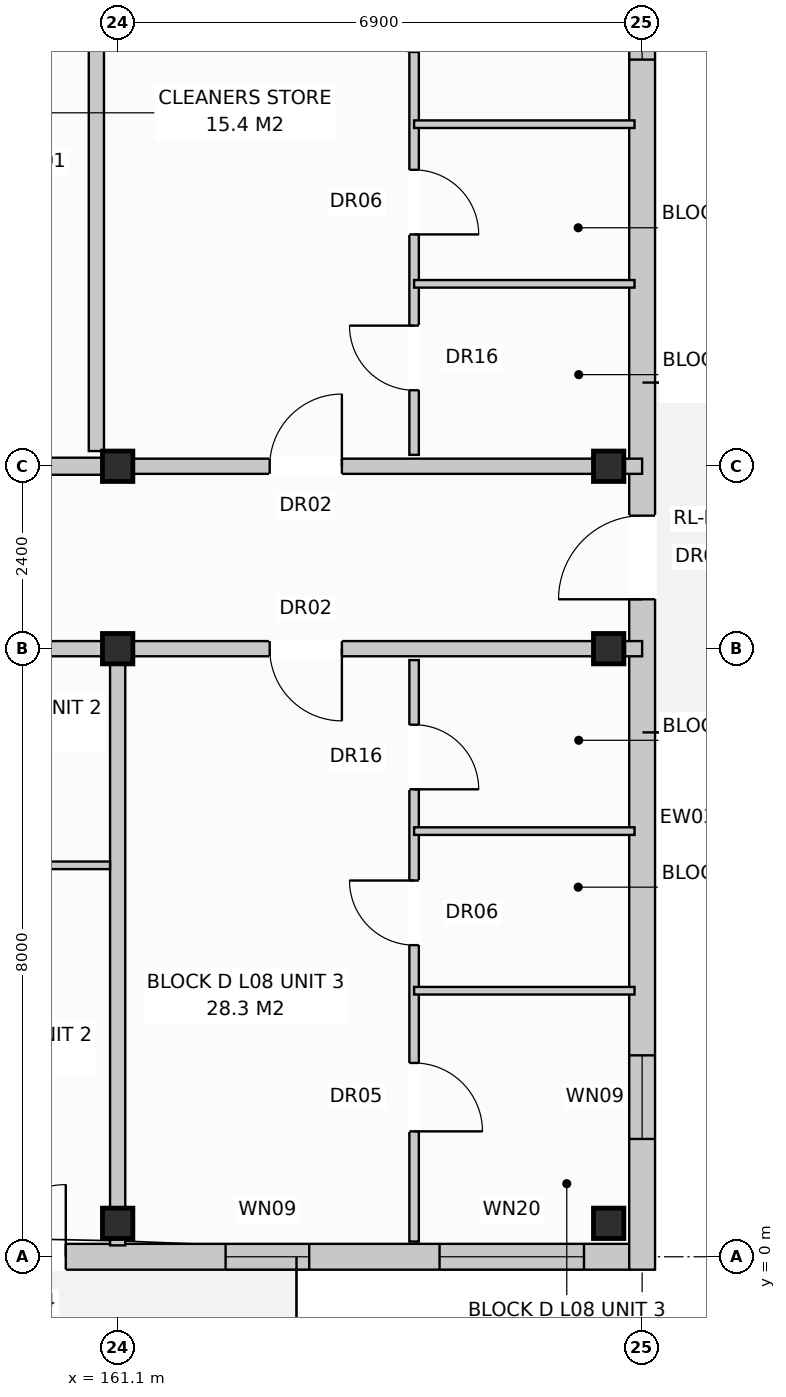
"""IFC4 building model, lengths in metres.
Left out: names, types, materials, properties, quantities, classifications, styles, units other than length and angle.
Written with IfcOpenShell. Run it as: python <this file> out.ifc"""

import sys

from ifc_helpers import new_model, si_unit, direction, frame, frame_2d, origin, origin_with_axes, origin_2d, place, context, subcontext, project, spatial, rectangle, extrude, element, fill, save


model = new_model("IFC4")
c1 = context("Model", 3, precision=1e-05, world=origin(), true_north=direction((0.0, 1.0)))
c2 = subcontext(c1, "Body", "Model", "MODEL_VIEW")
j1 = project(units=[si_unit("LENGTHUNIT", "METRE"), si_unit("PLANEANGLEUNIT", "RADIAN")], contexts=[c1])
p1 = place(None, origin())
s1 = spatial("IfcSite", under=j1, at=p1, CompositionType="ELEMENT")
p2 = place(p1, origin())
s2 = spatial("IfcBuilding", under=s1, at=p2, CompositionType="ELEMENT")
p3 = place(p2, frame((0.0, 0.0, 27.2)))
s3 = spatial("IfcBuildingStorey", under=s2, at=p3, CompositionType="ELEMENT", Elevation=27.2)
for number, where, z_axis, x_axis in (
    (1, (161.1, 0.44, 0.0), (0.0, 0.0, 1.0), (1.0, 0.0, 0.0)),
    (2, (161.1, 8.0, 0.0), (0.0, 0.0, 1.0), (1.0, 0.0, 0.0)),
    (3, (161.1, 10.4, 0.0), (0.0, 0.0, 1.0), (1.0, 0.0, 0.0)),
    (4, (167.56, 0.44, 0.0), (0.0, 0.0, 1.0), (1.0, 0.0, 0.0)),
    (5, (167.56, 8.0, 0.0), (0.0, 0.0, 1.0), (1.0, 0.0, 0.0)),
    (6, (167.56, 10.4, 0.0), (0.0, 0.0, 1.0), (1.0, 0.0, 0.0)),
):
    element("IfcColumn", number, at=place(p3, frame(where, z_axis=z_axis, x_axis=x_axis)), inside=s3, PredefinedType="COLUMN", context=c2, shape_type="SweptSolid", body=[
        extrude(rectangle(XDim=0.4, YDim=0.4, at=origin_2d()), origin(), (0.0, 0.0, 1.0), 3.2),
    ])
p4 = place(p3, frame((126.76, 0.0, 0.0), z_axis=(0.0, 0.0, 1.0), x_axis=(1.0, 0.0, 0.0)))
e7 = element("IfcWall", 7, at=p4, inside=s3, PredefinedType="STANDARD", context=c2, shape_type="SweptSolid", body=[
    extrude(rectangle(XDim=41.08, YDim=0.34, at=frame_2d((20.54, 0.0))), origin(), (0.0, 0.0, 1.0), 2.91),
])
p5 = place(p4, frame((7.41, 0.0, 0.0)))
e8 = element("IfcOpeningElement", 8, at=p5, cuts=e7, PredefinedType="OPENING", context=c2, shape_type="SweptSolid", body=[
    extrude(rectangle(XDim=0.95, YDim=2.1, at=frame_2d((0.475, 1.05))), frame((0.0, 0.182, 0.0), z_axis=(0.0, -1.0, 0.0), x_axis=(1.0, 0.0, 0.0)), (0.0, 0.0, 1.0), 0.364),
])
p6 = place(p4, frame((18.707, 0.0, 0.0)))
e9 = element("IfcOpeningElement", 9, at=p6, cuts=e7, PredefinedType="OPENING", context=c2, shape_type="SweptSolid", body=[
    extrude(rectangle(XDim=0.95, YDim=2.1, at=frame_2d((0.475, 1.05))), frame((0.0, 0.182, 0.0), z_axis=(0.0, -1.0, 0.0), x_axis=(1.0, 0.0, 0.0)), (0.0, 0.0, 1.0), 0.364),
])
p7 = place(p4, frame((32.707, 0.0, 0.0)))
e10 = element("IfcOpeningElement", 10, at=p7, cuts=e7, PredefinedType="OPENING", context=c2, shape_type="SweptSolid", body=[
    extrude(rectangle(XDim=0.95, YDim=2.1, at=frame_2d((0.475, 1.05))), frame((0.0, 0.182, 0.0), z_axis=(0.0, -1.0, 0.0), x_axis=(1.0, 0.0, 0.0)), (0.0, 0.0, 1.0), 0.364),
])
p8 = place(p4, frame((1.61, 0.0, 0.8)))
e11 = element("IfcOpeningElement", 11, at=p8, cuts=e7, PredefinedType="OPENING", context=c2, shape_type="SweptSolid", body=[
    extrude(rectangle(XDim=1.8, YDim=1.7, at=frame_2d((0.9, 0.85))), frame((0.0, 0.182, 0.0), z_axis=(0.0, -1.0, 0.0), x_axis=(1.0, 0.0, 0.0)), (0.0, 0.0, 1.0), 0.364),
])
p9 = place(p4, frame((10.46, 0.0, 0.8)))
e12 = element("IfcOpeningElement", 12, at=p9, cuts=e7, PredefinedType="OPENING", context=c2, shape_type="SweptSolid", body=[
    extrude(rectangle(XDim=1.9, YDim=1.85, at=frame_2d((0.95, 0.925))), frame((0.0, 0.182, 0.0), z_axis=(0.0, -1.0, 0.0), x_axis=(1.0, 0.0, 0.0)), (0.0, 0.0, 1.0), 0.364),
])
p10 = place(p4, frame((15.835, 0.0, 0.8)))
e13 = element("IfcOpeningElement", 13, at=p10, cuts=e7, PredefinedType="OPENING", context=c2, shape_type="SweptSolid", body=[
    extrude(rectangle(XDim=1.95, YDim=1.65, at=frame_2d((0.975, 0.825))), frame((0.0, 0.182, 0.0), z_axis=(0.0, -1.0, 0.0), x_axis=(1.0, 0.0, 0.0)), (0.0, 0.0, 1.0), 0.364),
])
p11 = place(p4, frame((21.96, 0.0, 0.72)))
e14 = element("IfcOpeningElement", 14, at=p11, cuts=e7, PredefinedType="OPENING", context=c2, shape_type="SweptSolid", body=[
    extrude(rectangle(XDim=1.1, YDim=1.5, at=frame_2d((0.55, 0.75))), frame((0.0, 0.182, 0.0), z_axis=(0.0, -1.0, 0.0), x_axis=(1.0, 0.0, 0.0)), (0.0, 0.0, 1.0), 0.364),
])
p12 = place(p4, frame((27.96, 0.0, 0.8)))
e15 = element("IfcOpeningElement", 15, at=p12, cuts=e7, PredefinedType="OPENING", context=c2, shape_type="SweptSolid", body=[
    extrude(rectangle(XDim=1.9, YDim=1.85, at=frame_2d((0.95, 0.925))), frame((0.0, 0.182, 0.0), z_axis=(0.0, -1.0, 0.0), x_axis=(1.0, 0.0, 0.0)), (0.0, 0.0, 1.0), 0.364),
])
p13 = place(p4, frame((30.81, 0.0, 0.85)))
e16 = element("IfcOpeningElement", 16, at=p13, cuts=e7, PredefinedType="OPENING", context=c2, shape_type="SweptSolid", body=[
    extrude(rectangle(XDim=1.5, YDim=1.65, at=frame_2d((0.75, 0.825))), frame((0.0, 0.182, 0.0), z_axis=(0.0, -1.0, 0.0), x_axis=(1.0, 0.0, 0.0)), (0.0, 0.0, 1.0), 0.364),
])
p14 = place(p4, frame((35.76, 0.0, 0.72)))
e17 = element("IfcOpeningElement", 17, at=p14, cuts=e7, PredefinedType="OPENING", context=c2, shape_type="SweptSolid", body=[
    extrude(rectangle(XDim=1.1, YDim=1.5, at=frame_2d((0.55, 0.75))), frame((0.0, 0.182, 0.0), z_axis=(0.0, -1.0, 0.0), x_axis=(1.0, 0.0, 0.0)), (0.0, 0.0, 1.0), 0.364),
])
p15 = place(p4, frame((38.575, 0.0, 0.8)))
e18 = element("IfcOpeningElement", 18, at=p15, cuts=e7, PredefinedType="OPENING", context=c2, shape_type="SweptSolid", body=[
    extrude(rectangle(XDim=1.9, YDim=1.85, at=frame_2d((0.95, 0.925))), frame((0.0, 0.182, 0.0), z_axis=(0.0, -1.0, 0.0), x_axis=(1.0, 0.0, 0.0)), (0.0, 0.0, 1.0), 0.364),
])
p16 = place(p3, frame((168.0, -0.17, 0.0), z_axis=(0.0, 0.0, 1.0), x_axis=(0.0, 1.0, 0.0)))
e19 = element("IfcWall", 19, at=p16, inside=s3, PredefinedType="STANDARD", context=c2, shape_type="SweptSolid", body=[
    extrude(rectangle(XDim=18.74, YDim=0.34, at=frame_2d((9.37, 0.0))), origin(), (0.0, 0.0, 1.0), 2.91),
])
p17 = place(p16, frame((8.82, 0.0, 0.0)))
e20 = element("IfcOpeningElement", 20, at=p17, cuts=e19, PredefinedType="OPENING", context=c2, shape_type="SweptSolid", body=[
    extrude(rectangle(XDim=1.1, YDim=2.1, at=frame_2d((0.55, 1.05))), frame((0.0, 0.182, 0.0), z_axis=(0.0, -1.0, 0.0), x_axis=(1.0, 0.0, 0.0)), (0.0, 0.0, 1.0), 0.364),
])
p18 = place(p16, frame((1.72, 0.0, 0.72)))
e21 = element("IfcOpeningElement", 21, at=p18, cuts=e19, PredefinedType="OPENING", context=c2, shape_type="SweptSolid", body=[
    extrude(rectangle(XDim=1.1, YDim=1.5, at=frame_2d((0.55, 0.75))), frame((0.0, 0.182, 0.0), z_axis=(0.0, -1.0, 0.0), x_axis=(1.0, 0.0, 0.0)), (0.0, 0.0, 1.0), 0.364),
])
p19 = place(p16, frame((15.92, 0.0, 0.72)))
e22 = element("IfcOpeningElement", 22, at=p19, cuts=e19, PredefinedType="OPENING", context=c2, shape_type="SweptSolid", body=[
    extrude(rectangle(XDim=1.1, YDim=1.5, at=frame_2d((0.55, 0.75))), frame((0.0, 0.182, 0.0), z_axis=(0.0, -1.0, 0.0), x_axis=(1.0, 0.0, 0.0)), (0.0, 0.0, 1.0), 0.364),
])
p20 = place(p3, frame((160.82, 10.6, 0.0), z_axis=(0.0, 0.0, 1.0), x_axis=(0.0, 1.0, 0.0)))
e23 = element("IfcWall", 23, at=p20, inside=s3, PredefinedType="PARTITIONING", context=c2, shape_type="SweptSolid", body=[
    extrude(rectangle(XDim=7.6, YDim=0.2, at=frame_2d((3.8, 0.0))), origin(), (0.0, 0.0, 1.0), 2.35),
])
p21 = place(p3, frame((151.1, 10.4, 0.0), z_axis=(0.0, 0.0, 1.0), x_axis=(1.0, 0.0, 0.0)))
e24 = element("IfcWall", 24, at=p21, inside=s3, PredefinedType="PARTITIONING", context=c2, shape_type="SweptSolid", body=[
    extrude(rectangle(XDim=10.0, YDim=0.225, at=frame_2d((5.0, 0.0))), origin(), (0.0, 0.0, 1.0), 2.35),
])
p22 = place(p21, frame((0.475, 0.0, 0.0)))
e25 = element("IfcOpeningElement", 25, at=p22, cuts=e24, PredefinedType="OPENING", context=c2, shape_type="SweptSolid", body=[
    extrude(rectangle(XDim=1.1, YDim=2.15, at=frame_2d((0.55, 1.075))), frame((0.0, 0.125, 0.0), z_axis=(0.0, -1.0, 0.0), x_axis=(1.0, 0.0, 0.0)), (0.0, 0.0, 1.0), 0.249),
])
p23 = place(p21, frame((5.85, 0.0, 0.0)))
e26 = element("IfcOpeningElement", 26, at=p23, cuts=e24, PredefinedType="OPENING", context=c2, shape_type="SweptSolid", body=[
    extrude(rectangle(XDim=0.9, YDim=2.1, at=frame_2d((0.45, 1.05))), frame((0.0, 0.125, 0.0), z_axis=(0.0, -1.0, 0.0), x_axis=(1.0, 0.0, 0.0)), (0.0, 0.0, 1.0), 0.249),
])
p24 = place(p21, frame((7.9, 0.0, 0.0)))
e27 = element("IfcOpeningElement", 27, at=p24, cuts=e24, PredefinedType="OPENING", context=c2, shape_type="SweptSolid", body=[
    extrude(rectangle(XDim=0.95, YDim=2.15, at=frame_2d((0.475, 1.075))), frame((0.0, 0.125, 0.0), z_axis=(0.0, -1.0, 0.0), x_axis=(1.0, 0.0, 0.0)), (0.0, 0.0, 1.0), 0.249),
])
p25 = place(p3, frame((161.1, 7.85, 0.0), z_axis=(0.0, 0.0, 1.0), x_axis=(0.0, -1.0, 0.0)))
e28 = element("IfcWall", 28, at=p25, inside=s3, PredefinedType="PARTITIONING", context=c2, shape_type="SweptSolid", body=[
    extrude(rectangle(XDim=7.7, YDim=0.2, at=frame_2d((3.85, 0.0))), origin(), (0.0, 0.0, 1.0), 2.35),
])
p26 = place(p3, frame((140.4, 8.0, 0.0), z_axis=(0.0, 0.0, 1.0), x_axis=(1.0, 0.0, 0.0)))
e29 = element("IfcWall", 29, at=p26, inside=s3, PredefinedType="PARTITIONING", context=c2, shape_type="SweptSolid", body=[
    extrude(rectangle(XDim=20.7, YDim=0.2, at=frame_2d((10.35, 0.0))), origin(), (0.0, 0.0, 1.0), 2.35),
])
p27 = place(p26, frame((2.4, 0.0, 0.0)))
e30 = element("IfcOpeningElement", 30, at=p27, cuts=e29, PredefinedType="OPENING", context=c2, shape_type="SweptSolid", body=[
    extrude(rectangle(XDim=0.95, YDim=2.15, at=frame_2d((0.475, 1.075))), frame((0.0, 0.112, 0.0), z_axis=(0.0, -1.0, 0.0), x_axis=(1.0, 0.0, 0.0)), (0.0, 0.0, 1.0), 0.224),
])
p28 = place(p3, frame((146.7, 5.15, 0.0), z_axis=(0.0, 0.0, 1.0), x_axis=(1.0, 0.0, 0.0)))
e31 = element("IfcWall", 31, at=p28, inside=s3, PredefinedType="PARTITIONING", context=c2, shape_type="SweptSolid", body=[
    extrude(rectangle(XDim=14.3, YDim=0.1, at=frame_2d((7.15, 0.0))), origin(), (0.0, 0.0, 1.0), 2.96),
])
p29 = place(p28, frame((1.6, 0.0, 0.0)))
e32 = element("IfcOpeningElement", 32, at=p29, cuts=e31, PredefinedType="OPENING", context=c2, shape_type="SweptSolid", body=[
    extrude(rectangle(XDim=0.9, YDim=2.1, at=frame_2d((0.45, 1.05))), frame((0.0, 0.062, 0.0), z_axis=(0.0, -1.0, 0.0), x_axis=(1.0, 0.0, 0.0)), (0.0, 0.0, 1.0), 0.124),
])
p30 = place(p28, frame((5.1, 0.0, 0.0)))
e33 = element("IfcOpeningElement", 33, at=p30, cuts=e31, PredefinedType="OPENING", context=c2, shape_type="SweptSolid", body=[
    extrude(rectangle(XDim=0.85, YDim=2.05, at=frame_2d((0.425, 1.025))), frame((0.0, 0.062, 0.0), z_axis=(0.0, -1.0, 0.0), x_axis=(1.0, 0.0, 0.0)), (0.0, 0.0, 1.0), 0.124),
])
p31 = place(p28, frame((8.2, 0.0, 0.0)))
e34 = element("IfcOpeningElement", 34, at=p31, cuts=e31, PredefinedType="OPENING", context=c2, shape_type="SweptSolid", body=[
    extrude(rectangle(XDim=0.85, YDim=2.05, at=frame_2d((0.425, 1.025))), frame((0.0, 0.062, 0.0), z_axis=(0.0, -1.0, 0.0), x_axis=(1.0, 0.0, 0.0)), (0.0, 0.0, 1.0), 0.124),
])
p32 = place(p28, frame((11.6, 0.0, 0.0)))
e35 = element("IfcOpeningElement", 35, at=p32, cuts=e31, PredefinedType="OPENING", context=c2, shape_type="SweptSolid", body=[
    extrude(rectangle(XDim=0.85, YDim=2.05, at=frame_2d((0.425, 1.025))), frame((0.0, 0.062, 0.0), z_axis=(0.0, -1.0, 0.0), x_axis=(1.0, 0.0, 0.0)), (0.0, 0.0, 1.0), 0.124),
])
p33 = place(p3, frame((161.1, 8.0, 0.0), z_axis=(0.0, 0.0, 1.0), x_axis=(1.0, 0.0, 0.0)))
e36 = element("IfcWall", 36, at=p33, inside=s3, PredefinedType="PARTITIONING", context=c2, shape_type="SweptSolid", body=[
    extrude(rectangle(XDim=6.9, YDim=0.2, at=frame_2d((3.45, 0.0))), origin(), (0.0, 0.0, 1.0), 2.35),
])
p34 = place(p33, frame((2.0, 0.0, 0.0)))
e37 = element("IfcOpeningElement", 37, at=p34, cuts=e36, PredefinedType="OPENING", context=c2, shape_type="SweptSolid", body=[
    extrude(rectangle(XDim=0.95, YDim=2.15, at=frame_2d((0.475, 1.075))), frame((0.0, 0.112, 0.0), z_axis=(0.0, -1.0, 0.0), x_axis=(1.0, 0.0, 0.0)), (0.0, 0.0, 1.0), 0.224),
])
p35 = place(p3, frame((165.0, 7.85, 0.0), z_axis=(0.0, 0.0, 1.0), x_axis=(0.0, -1.0, 0.0)))
e38 = element("IfcWall", 38, at=p35, inside=s3, PredefinedType="PARTITIONING", context=c2, shape_type="SweptSolid", body=[
    extrude(rectangle(XDim=7.65, YDim=0.125, at=frame_2d((3.825, 0.0))), origin(), (0.0, 0.0, 1.0), 2.96),
])
p36 = place(p35, frame((0.85, 0.0, 0.0)))
e39 = element("IfcOpeningElement", 39, at=p36, cuts=e38, PredefinedType="OPENING", context=c2, shape_type="SweptSolid", body=[
    extrude(rectangle(XDim=0.85, YDim=2.1, at=frame_2d((0.425, 1.05))), frame((0.0, 0.074, 0.0), z_axis=(0.0, -1.0, 0.0), x_axis=(1.0, 0.0, 0.0)), (0.0, 0.0, 1.0), 0.149),
])
p37 = place(p35, frame((2.9, 0.0, 0.0)))
e40 = element("IfcOpeningElement", 40, at=p37, cuts=e38, PredefinedType="OPENING", context=c2, shape_type="SweptSolid", body=[
    extrude(rectangle(XDim=0.85, YDim=2.05, at=frame_2d((0.425, 1.025))), frame((0.0, 0.074, 0.0), z_axis=(0.0, -1.0, 0.0), x_axis=(1.0, 0.0, 0.0)), (0.0, 0.0, 1.0), 0.149),
])
p38 = place(p35, frame((5.3, 0.0, 0.0)))
e41 = element("IfcOpeningElement", 41, at=p38, cuts=e38, PredefinedType="OPENING", context=c2, shape_type="SweptSolid", body=[
    extrude(rectangle(XDim=0.9, YDim=2.1, at=frame_2d((0.45, 1.05))), frame((0.0, 0.074, 0.0), z_axis=(0.0, -1.0, 0.0), x_axis=(1.0, 0.0, 0.0)), (0.0, 0.0, 1.0), 0.149),
])
for number, where, z_axis, x_axis in (
    (42, (165.0, 5.6, 0.0), (0.0, 0.0, 1.0), (1.0, 0.0, 0.0)),
    (43, (165.0, 3.5, 0.0), (0.0, 0.0, 1.0), (1.0, 0.0, 0.0)),
):
    element("IfcWall", number, at=place(p3, frame(where, z_axis=z_axis, x_axis=x_axis)), inside=s3, PredefinedType="PARTITIONING", context=c2, shape_type="SweptSolid", body=[
        extrude(rectangle(XDim=2.9, YDim=0.1, at=frame_2d((1.45, 0.0))), origin(), (0.0, 0.0, 1.0), 2.96),
    ])
p39 = place(p3, frame((161.1, 10.4, 0.0), z_axis=(0.0, 0.0, 1.0), x_axis=(1.0, 0.0, 0.0)))
e44 = element("IfcWall", 44, at=p39, inside=s3, PredefinedType="PARTITIONING", context=c2, shape_type="SweptSolid", body=[
    extrude(rectangle(XDim=6.9, YDim=0.2, at=frame_2d((3.45, 0.0))), origin(), (0.0, 0.0, 1.0), 2.35),
])
p40 = place(p39, frame((2.0, 0.0, 0.0)))
e45 = element("IfcOpeningElement", 45, at=p40, cuts=e44, PredefinedType="OPENING", context=c2, shape_type="SweptSolid", body=[
    extrude(rectangle(XDim=0.95, YDim=2.15, at=frame_2d((0.475, 1.075))), frame((0.0, 0.112, 0.0), z_axis=(0.0, -1.0, 0.0), x_axis=(1.0, 0.0, 0.0)), (0.0, 0.0, 1.0), 0.224),
])
p41 = place(p3, frame((165.0, 10.55, 0.0), z_axis=(0.0, 0.0, 1.0), x_axis=(0.0, 1.0, 0.0)))
e46 = element("IfcWall", 46, at=p41, inside=s3, PredefinedType="PARTITIONING", context=c2, shape_type="SweptSolid", body=[
    extrude(rectangle(XDim=7.65, YDim=0.125, at=frame_2d((3.825, 0.0))), origin(), (0.0, 0.0, 1.0), 2.96),
])
p42 = place(p41, frame((0.85, 0.0, 0.0)))
e47 = element("IfcOpeningElement", 47, at=p42, cuts=e46, PredefinedType="OPENING", context=c2, shape_type="SweptSolid", body=[
    extrude(rectangle(XDim=0.85, YDim=2.1, at=frame_2d((0.425, 1.05))), frame((0.0, 0.074, 0.0), z_axis=(0.0, -1.0, 0.0), x_axis=(1.0, 0.0, 0.0)), (0.0, 0.0, 1.0), 0.149),
])
p43 = place(p41, frame((2.9, 0.0, 0.0)))
e48 = element("IfcOpeningElement", 48, at=p43, cuts=e46, PredefinedType="OPENING", context=c2, shape_type="SweptSolid", body=[
    extrude(rectangle(XDim=0.85, YDim=2.05, at=frame_2d((0.425, 1.025))), frame((0.0, 0.074, 0.0), z_axis=(0.0, -1.0, 0.0), x_axis=(1.0, 0.0, 0.0)), (0.0, 0.0, 1.0), 0.149),
])
p44 = place(p41, frame((5.3, 0.0, 0.0)))
e49 = element("IfcOpeningElement", 49, at=p44, cuts=e46, PredefinedType="OPENING", context=c2, shape_type="SweptSolid", body=[
    extrude(rectangle(XDim=0.9, YDim=2.1, at=frame_2d((0.45, 1.05))), frame((0.0, 0.074, 0.0), z_axis=(0.0, -1.0, 0.0), x_axis=(1.0, 0.0, 0.0)), (0.0, 0.0, 1.0), 0.149),
])
for number, where, z_axis, x_axis in (
    (50, (165.0, 12.8, 0.0), (0.0, 0.0, 1.0), (1.0, 0.0, 0.0)),
    (51, (165.0, 14.9, 0.0), (0.0, 0.0, 1.0), (1.0, 0.0, 0.0)),
):
    element("IfcWall", number, at=place(p3, frame(where, z_axis=z_axis, x_axis=x_axis)), inside=s3, PredefinedType="PARTITIONING", context=c2, shape_type="SweptSolid", body=[
        extrude(rectangle(XDim=2.9, YDim=0.1, at=frame_2d((1.45, 0.0))), origin(), (0.0, 0.0, 1.0), 2.96),
    ])
p45 = place(p7, origin_with_axes())
e52 = element("IfcDoor", 52, at=p45, inside=s3, OperationType="SINGLE_SWING_RIGHT", PredefinedType="DOOR", context=c2, shape_type="SweptSolid", body=[
    extrude(rectangle(XDim=0.95, YDim=2.1, at=frame_2d((0.475, 1.05))), frame((0.0, 0.025, 0.0), z_axis=(0.0, -1.0, 0.0), x_axis=(1.0, 0.0, 0.0)), (0.0, 0.0, 1.0), 0.05),
])
fill(e10, e52)
p46 = place(p14, origin_with_axes())
e53 = element("IfcWindow", 53, at=p46, inside=s3, PartitioningType="SINGLE_PANEL", PredefinedType="WINDOW", context=c2, shape_type="SweptSolid", body=[
    extrude(rectangle(XDim=1.1, YDim=1.5, at=frame_2d((0.55, 0.75))), frame((0.0, 0.03, 0.0), z_axis=(0.0, -1.0, 0.0), x_axis=(1.0, 0.0, 0.0)), (0.0, 0.0, 1.0), 0.06),
])
fill(e17, e53)
p47 = place(p15, origin_with_axes())
e54 = element("IfcWindow", 54, at=p47, inside=s3, PartitioningType="SINGLE_PANEL", PredefinedType="WINDOW", context=c2, shape_type="SweptSolid", body=[
    extrude(rectangle(XDim=1.9, YDim=1.85, at=frame_2d((0.95, 0.925))), frame((0.0, 0.03, 0.0), z_axis=(0.0, -1.0, 0.0), x_axis=(1.0, 0.0, 0.0)), (0.0, 0.0, 1.0), 0.06),
])
fill(e18, e54)
p48 = place(p17, origin_with_axes())
e55 = element("IfcDoor", 55, at=p48, inside=s3, OperationType="SINGLE_SWING_LEFT", PredefinedType="DOOR", context=c2, shape_type="SweptSolid", body=[
    extrude(rectangle(XDim=1.1, YDim=2.1, at=frame_2d((0.55, 1.05))), frame((0.0, 0.025, 0.0), z_axis=(0.0, -1.0, 0.0), x_axis=(1.0, 0.0, 0.0)), (0.0, 0.0, 1.0), 0.05),
])
fill(e20, e55)
p49 = place(p18, origin_with_axes())
e56 = element("IfcWindow", 56, at=p49, inside=s3, PartitioningType="SINGLE_PANEL", PredefinedType="WINDOW", context=c2, shape_type="SweptSolid", body=[
    extrude(rectangle(XDim=1.1, YDim=1.5, at=frame_2d((0.55, 0.75))), frame((0.0, 0.03, 0.0), z_axis=(0.0, -1.0, 0.0), x_axis=(1.0, 0.0, 0.0)), (0.0, 0.0, 1.0), 0.06),
])
fill(e21, e56)
p50 = place(p19, origin_with_axes())
e57 = element("IfcWindow", 57, at=p50, inside=s3, PartitioningType="SINGLE_PANEL", PredefinedType="WINDOW", context=c2, shape_type="SweptSolid", body=[
    extrude(rectangle(XDim=1.1, YDim=1.5, at=frame_2d((0.55, 0.75))), frame((0.0, 0.03, 0.0), z_axis=(0.0, -1.0, 0.0), x_axis=(1.0, 0.0, 0.0)), (0.0, 0.0, 1.0), 0.06),
])
fill(e22, e57)
p51 = place(p34, frame((0.95, 0.0, 0.0), z_axis=(0.0, 0.0, 1.0), x_axis=(-1.0, 0.0, 0.0)))
e58 = element("IfcDoor", 58, at=p51, inside=s3, OperationType="SINGLE_SWING_RIGHT", PredefinedType="DOOR", context=c2, shape_type="SweptSolid", body=[
    extrude(rectangle(XDim=0.95, YDim=2.15, at=frame_2d((0.475, 1.075))), frame((0.0, 0.025, 0.0), z_axis=(0.0, -1.0, 0.0), x_axis=(1.0, 0.0, 0.0)), (0.0, 0.0, 1.0), 0.05),
])
fill(e37, e58)
p52 = place(p36, origin_with_axes())
e59 = element("IfcDoor", 59, at=p52, inside=s3, OperationType="SINGLE_SWING_RIGHT", PredefinedType="DOOR", context=c2, shape_type="SweptSolid", body=[
    extrude(rectangle(XDim=0.85, YDim=2.1, at=frame_2d((0.425, 1.05))), frame((0.0, 0.025, 0.0), z_axis=(0.0, -1.0, 0.0), x_axis=(1.0, 0.0, 0.0)), (0.0, 0.0, 1.0), 0.05),
])
fill(e39, e59)
p53 = place(p37, frame((0.85, 0.0, 0.0), z_axis=(0.0, 0.0, 1.0), x_axis=(-1.0, 0.0, 0.0)))
e60 = element("IfcDoor", 60, at=p53, inside=s3, OperationType="SINGLE_SWING_LEFT", PredefinedType="DOOR", context=c2, shape_type="SweptSolid", body=[
    extrude(rectangle(XDim=0.85, YDim=2.05, at=frame_2d((0.425, 1.025))), frame((0.0, 0.025, 0.0), z_axis=(0.0, -1.0, 0.0), x_axis=(1.0, 0.0, 0.0)), (0.0, 0.0, 1.0), 0.05),
])
fill(e40, e60)
p54 = place(p38, origin_with_axes())
e61 = element("IfcDoor", 61, at=p54, inside=s3, OperationType="SINGLE_SWING_RIGHT", PredefinedType="DOOR", context=c2, shape_type="SweptSolid", body=[
    extrude(rectangle(XDim=0.9, YDim=2.1, at=frame_2d((0.45, 1.05))), frame((0.0, 0.025, 0.0), z_axis=(0.0, -1.0, 0.0), x_axis=(1.0, 0.0, 0.0)), (0.0, 0.0, 1.0), 0.05),
])
fill(e41, e61)
p55 = place(p40, origin_with_axes())
e62 = element("IfcDoor", 62, at=p55, inside=s3, OperationType="SINGLE_SWING_RIGHT", PredefinedType="DOOR", context=c2, shape_type="SweptSolid", body=[
    extrude(rectangle(XDim=0.95, YDim=2.15, at=frame_2d((0.475, 1.075))), frame((0.0, 0.025, 0.0), z_axis=(0.0, -1.0, 0.0), x_axis=(1.0, 0.0, 0.0)), (0.0, 0.0, 1.0), 0.05),
])
fill(e45, e62)
p56 = place(p42, origin_with_axes())
e63 = element("IfcDoor", 63, at=p56, inside=s3, OperationType="SINGLE_SWING_RIGHT", PredefinedType="DOOR", context=c2, shape_type="SweptSolid", body=[
    extrude(rectangle(XDim=0.85, YDim=2.1, at=frame_2d((0.425, 1.05))), frame((0.0, 0.025, 0.0), z_axis=(0.0, -1.0, 0.0), x_axis=(1.0, 0.0, 0.0)), (0.0, 0.0, 1.0), 0.05),
])
fill(e47, e63)
p57 = place(p43, frame((0.85, 0.0, 0.0), z_axis=(0.0, 0.0, 1.0), x_axis=(-1.0, 0.0, 0.0)))
e64 = element("IfcDoor", 64, at=p57, inside=s3, OperationType="SINGLE_SWING_LEFT", PredefinedType="DOOR", context=c2, shape_type="SweptSolid", body=[
    extrude(rectangle(XDim=0.85, YDim=2.05, at=frame_2d((0.425, 1.025))), frame((0.0, 0.025, 0.0), z_axis=(0.0, -1.0, 0.0), x_axis=(1.0, 0.0, 0.0)), (0.0, 0.0, 1.0), 0.05),
])
fill(e48, e64)
save(model, sys.argv[1])
